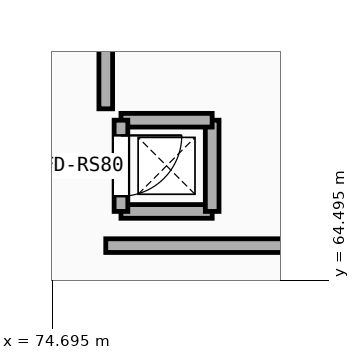
"""IFC4 building model, lengths in metres.
Left out: names, types, materials, properties, quantities, classifications, styles, units other than length and angle.
Written with IfcOpenShell. Run it as: python <this file> out.ifc"""

import sys

from ifc_helpers import new_model, si_unit, direction, frame, frame_2d, origin, place, context, subcontext, project, spatial, rectangle, extrude, element, fill, save


model = new_model("IFC4")
c1 = context("Model", 3, precision=1e-05, world=origin(), true_north=direction((0.0, 1.0)))
c2 = subcontext(c1, "Body", "Model", "MODEL_VIEW")
j1 = project(units=[si_unit("LENGTHUNIT", "METRE"), si_unit("PLANEANGLEUNIT", "RADIAN")], contexts=[c1])
p1 = place(None, origin())
s1 = spatial("IfcSite", under=j1, at=p1, CompositionType="ELEMENT")
p2 = place(p1, origin())
s2 = spatial("IfcBuilding", under=s1, at=p2, CompositionType="ELEMENT")
p3 = place(p2, frame((0.0, 0.0, 9.6)))
s3 = spatial("IfcBuildingStorey", under=s2, at=p3, CompositionType="ELEMENT", Elevation=9.6)
p4 = place(p3, frame((75.4, 64.95, 0.0), z_axis=(0.0, 0.0, 1.0), x_axis=(1.0, 0.0, 0.0)))
e1 = element("IfcWall", 1, at=p4, inside=s3, PredefinedType="PARTITIONING", context=c2, shape_type="SweptSolid", body=[
    extrude(rectangle(XDim=11.26, YDim=0.18, at=frame_2d((5.63, 0.0))), origin(), (0.0, 0.0, 1.0), 3.47),
])
p5 = place(p3, frame((75.4, 66.75, 0.0), z_axis=(0.0, 0.0, 1.0), x_axis=(0.0, 1.0, 0.0)))
e2 = element("IfcWall", 2, at=p5, inside=s3, PredefinedType="PARTITIONING", context=c2, shape_type="SweptSolid", body=[
    extrude(rectangle(XDim=30.75, YDim=0.18, at=frame_2d((15.375, 0.0))), origin(), (0.0, 0.0, 1.0), 3.27),
])
p6 = place(p5, frame((6.413, 0.0, -0.01)))
e3 = element("IfcOpeningElement", 3, at=p6, cuts=e2, PredefinedType="OPENING", context=c2, shape_type="SweptSolid", body=[
    extrude(rectangle(XDim=1.6, YDim=2.21, at=frame_2d((0.8, 1.105))), frame((0.0, 0.1, 0.0), z_axis=(0.0, -1.0, 0.0), x_axis=(1.0, 0.0, 0.0)), (0.0, 0.0, 1.0), 0.2),
])
p7 = place(p3, frame((75.6, 65.4, 0.0), z_axis=(0.0, 0.0, 1.0), x_axis=(1.0, 0.0, 0.0)))
e4 = element("IfcWall", 4, at=p7, inside=s3, PredefinedType="SOLIDWALL", context=c2, shape_type="SweptSolid", body=[
    extrude(rectangle(XDim=1.2, YDim=0.18, at=frame_2d((0.6, 0.0))), origin(), (0.0, 0.0, 1.0), 3.97),
])
p8 = place(p3, frame((76.8, 65.4, 0.0), z_axis=(0.0, 0.0, 1.0), x_axis=(0.0, 1.0, 0.0)))
e5 = element("IfcWall", 5, at=p8, inside=s3, PredefinedType="SOLIDWALL", context=c2, shape_type="SweptSolid", body=[
    extrude(rectangle(XDim=1.2, YDim=0.18, at=frame_2d((0.6, 0.0))), origin(), (0.0, 0.0, 1.0), 3.97),
])
p9 = place(p3, frame((76.8, 66.6, 0.0), z_axis=(0.0, 0.0, 1.0), x_axis=(-1.0, 0.0, 0.0)))
e6 = element("IfcWall", 6, at=p9, inside=s3, PredefinedType="SOLIDWALL", context=c2, shape_type="SweptSolid", body=[
    extrude(rectangle(XDim=1.2, YDim=0.18, at=frame_2d((0.6, 0.0))), origin(), (0.0, 0.0, 1.0), 3.97),
])
p10 = place(p3, frame((75.6, 66.6, 0.0), z_axis=(0.0, 0.0, 1.0), x_axis=(0.0, -1.0, 0.0)))
e7 = element("IfcWall", 7, at=p10, inside=s3, PredefinedType="SOLIDWALL", context=c2, shape_type="SweptSolid", body=[
    extrude(rectangle(XDim=1.2, YDim=0.18, at=frame_2d((0.6, 0.0))), origin(), (0.0, 0.0, 1.0), 3.97),
])
p11 = place(p10, frame((0.2, 0.0, -0.01)))
e8 = element("IfcOpeningElement", 8, at=p11, cuts=e7, PredefinedType="OPENING", context=c2, shape_type="SweptSolid", body=[
    extrude(rectangle(XDim=0.8, YDim=2.06, at=frame_2d((0.4, 1.03))), frame((0.0, 0.1, 0.0), z_axis=(0.0, -1.0, 0.0), x_axis=(1.0, 0.0, 0.0)), (0.0, 0.0, 1.0), 0.2),
])
p12 = place(p11, frame((0.0, 0.0, 0.01)))
e9 = element("IfcDoor", 9, at=p12, inside=s3, OperationType="SINGLE_SWING_LEFT", PredefinedType="DOOR", context=c2, shape_type="SweptSolid", body=[
    extrude(rectangle(XDim=0.8, YDim=2.05, at=frame_2d((0.4, 1.025))), frame((0.0, 0.025, 0.0), z_axis=(0.0, -1.0, 0.0), x_axis=(1.0, 0.0, 0.0)), (0.0, 0.0, 1.0), 0.05),
])
fill(e8, e9)
save(model, sys.argv[1])
